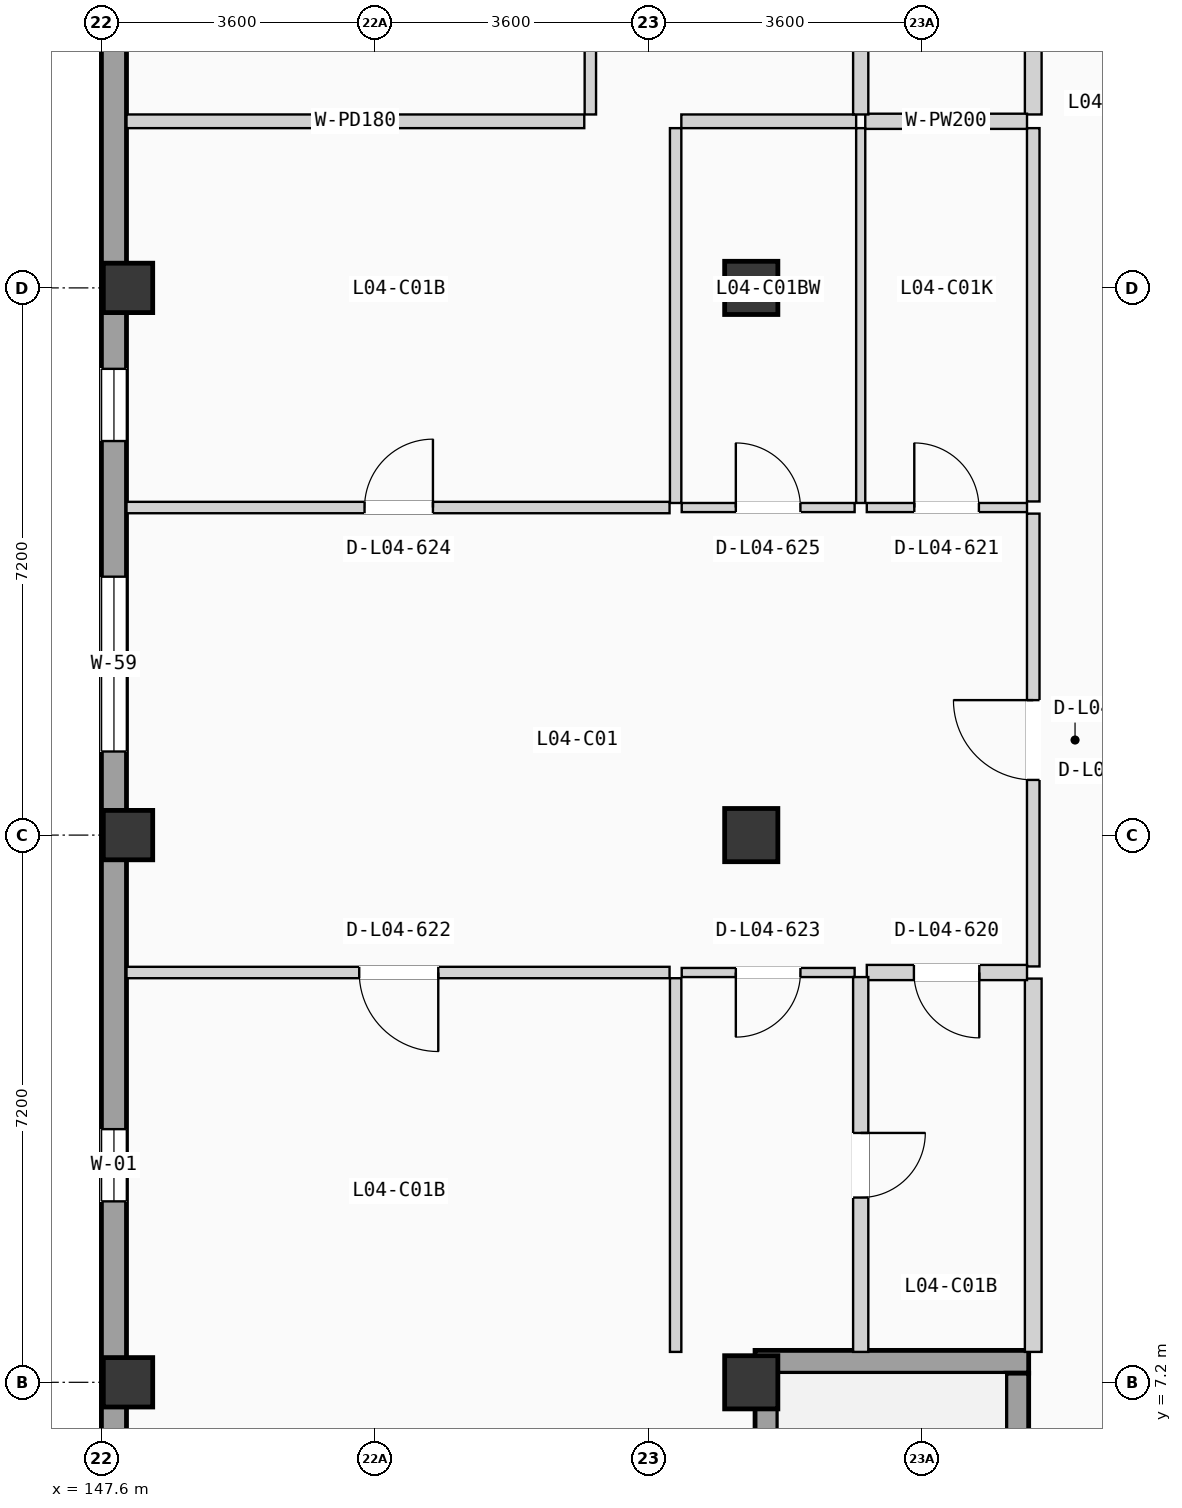
"""IFC4 building model, lengths in metres.
Left out: names, types, materials, properties, quantities, classifications, styles, units other than length and angle.
Written with IfcOpenShell. Run it as: python <this file> out.ifc"""

import sys

from ifc_helpers import new_model, si_unit, direction, frame, frame_2d, origin, origin_2d, place, context, subcontext, project, spatial, rectangle, extrude, element, fill, save


model = new_model("IFC4")
c1 = context("Model", 3, precision=1e-05, world=origin(), true_north=direction((0.0, 1.0)))
c2 = subcontext(c1, "Body", "Model", "MODEL_VIEW")
j1 = project(units=[si_unit("LENGTHUNIT", "METRE"), si_unit("PLANEANGLEUNIT", "RADIAN")], contexts=[c1])
p1 = place(None, origin())
s1 = spatial("IfcSite", under=j1, at=p1, CompositionType="ELEMENT")
p2 = place(p1, origin())
s2 = spatial("IfcBuilding", under=s1, at=p2, CompositionType="ELEMENT")
p3 = place(p2, frame((0.0, 0.0, 15.225)))
s3 = spatial("IfcBuildingStorey", under=s2, at=p3, CompositionType="ELEMENT", Elevation=15.225)
for number, where, z_axis, x_axis in (
    (1, (147.95, 7.2, 0.0), (0.0, 0.0, 1.0), (1.0, 0.0, 0.0)),
    (2, (147.95, 14.4, 0.0), (0.0, 0.0, 1.0), (1.0, 0.0, 0.0)),
    (3, (147.95, 21.6, 0.0), (0.0, 0.0, 1.0), (1.0, 0.0, 0.0)),
):
    element("IfcColumn", number, at=place(p3, frame(where, z_axis=z_axis, x_axis=x_axis)), inside=s3, PredefinedType="COLUMN", context=c2, shape_type="SweptSolid", body=[
        extrude(rectangle(XDim=0.65, YDim=0.65, at=origin_2d()), origin(), (0.0, 0.0, 1.0), 3.15),
    ])
for number, where, z_axis, x_axis in (
    (4, (156.15, 7.2, 0.0), (0.0, 0.0, 1.0), (1.0, 0.0, 0.0)),
    (5, (156.15, 14.4, 0.0), (0.0, 0.0, 1.0), (1.0, 0.0, 0.0)),
    (6, (156.15, 21.6, 0.0), (0.0, 0.0, 1.0), (1.0, 0.0, 0.0)),
):
    element("IfcColumn", number, at=place(p3, frame(where, z_axis=z_axis, x_axis=x_axis)), inside=s3, PredefinedType="COLUMN", context=c2, shape_type="SweptSolid", body=[
        extrude(rectangle(XDim=0.7, YDim=0.7, at=origin_2d()), origin(), (0.0, 0.0, 1.0), 3.15),
    ])
p4 = place(p3, frame((147.765, 0.33, 0.0), z_axis=(0.0, 0.0, 1.0), x_axis=(0.0, 1.0, 0.0)))
e7 = element("IfcWall", 7, at=p4, inside=s3, PredefinedType="SOLIDWALL", context=c2, shape_type="SweptSolid", body=[
    extrude(rectangle(XDim=49.74, YDim=0.33, at=frame_2d((24.87, 0.0))), origin(), (0.0, 0.0, 1.0), 2.89),
])
p5 = place(p4, frame((15.17, 0.0, 0.555)))
e8 = element("IfcOpeningElement", 8, at=p5, cuts=e7, PredefinedType="OPENING", context=c2, shape_type="SweptSolid", body=[
    extrude(rectangle(XDim=2.3, YDim=1.65, at=frame_2d((1.15, 0.825))), frame((0.0, 0.175, 0.0), z_axis=(0.0, -1.0, 0.0), x_axis=(1.0, 0.0, 0.0)), (0.0, 0.0, 1.0), 0.35),
])
p6 = place(p4, frame((9.251, 0.0, 0.85)))
e9 = element("IfcOpeningElement", 9, at=p6, cuts=e7, PredefinedType="OPENING", context=c2, shape_type="SweptSolid", body=[
    extrude(rectangle(XDim=0.95, YDim=1.2, at=frame_2d((0.475, 0.6))), frame((0.0, 0.175, 0.0), z_axis=(0.0, -1.0, 0.0), x_axis=(1.0, 0.0, 0.0)), (0.0, 0.0, 1.0), 0.35),
])
p7 = place(p4, frame((19.255, 0.0, 0.9)))
e10 = element("IfcOpeningElement", 10, at=p7, cuts=e7, PredefinedType="OPENING", context=c2, shape_type="SweptSolid", body=[
    extrude(rectangle(XDim=0.95, YDim=1.2, at=frame_2d((0.475, 0.6))), frame((0.0, 0.175, 0.0), z_axis=(0.0, -1.0, 0.0), x_axis=(1.0, 0.0, 0.0)), (0.0, 0.0, 1.0), 0.35),
])
p8 = place(p4, frame((31.616, 0.0, 0.855)))
e11 = element("IfcOpeningElement", 11, at=p8, cuts=e7, PredefinedType="OPENING", context=c2, shape_type="SweptSolid", body=[
    extrude(rectangle(XDim=0.95, YDim=1.35, at=frame_2d((0.475, 0.675))), frame((0.0, 0.175, 0.0), z_axis=(0.0, -1.0, 0.0), x_axis=(1.0, 0.0, 0.0)), (0.0, 0.0, 1.0), 0.35),
])
p9 = place(p4, frame((25.401, 0.0, 0.705)))
e12 = element("IfcOpeningElement", 12, at=p9, cuts=e7, PredefinedType="OPENING", context=c2, shape_type="SweptSolid", body=[
    extrude(rectangle(XDim=0.95, YDim=1.5, at=frame_2d((0.475, 0.75))), frame((0.0, 0.175, 0.0), z_axis=(0.0, -1.0, 0.0), x_axis=(1.0, 0.0, 0.0)), (0.0, 0.0, 1.0), 0.35),
])
p10 = place(p4, frame((38.73, 0.0, 0.555)))
e13 = element("IfcOpeningElement", 13, at=p10, cuts=e7, PredefinedType="OPENING", context=c2, shape_type="SweptSolid", body=[
    extrude(rectangle(XDim=0.95, YDim=1.65, at=frame_2d((0.475, 0.825))), frame((0.0, 0.175, 0.0), z_axis=(0.0, -1.0, 0.0), x_axis=(1.0, 0.0, 0.0)), (0.0, 0.0, 1.0), 0.35),
])
p11 = place(p3, frame((156.2, 7.47, 0.0), z_axis=(0.0, 0.0, 1.0), x_axis=(1.0, 0.0, 0.0)))
e14 = element("IfcWall", 14, at=p11, inside=s3, PredefinedType="SHEAR", context=c2, shape_type="SweptSolid", body=[
    extrude(rectangle(XDim=3.6, YDim=0.3, at=frame_2d((1.8, 0.0))), origin(), (0.0, 0.0, 1.0), 2.89),
])
p12 = place(p3, frame((156.35, 0.32, 0.0), z_axis=(0.0, 0.0, 1.0), x_axis=(0.0, 1.0, 0.0)))
e15 = element("IfcWall", 15, at=p12, inside=s3, PredefinedType="SHEAR", context=c2, shape_type="SweptSolid", body=[
    extrude(rectangle(XDim=7.0, YDim=0.3, at=frame_2d((3.5, 0.0))), origin(), (0.0, 0.0, 1.0), 2.89),
])
p13 = place(p3, frame((159.65, 0.32, 0.0), z_axis=(0.0, 0.0, 1.0), x_axis=(0.0, 1.0, 0.0)))
e16 = element("IfcWall", 16, at=p13, inside=s3, PredefinedType="SHEAR", context=c2, shape_type="SweptSolid", body=[
    extrude(rectangle(XDim=7.0, YDim=0.3, at=frame_2d((3.5, 0.0))), origin(), (0.0, 0.0, 1.0), 2.89),
])
p14 = place(p13, frame((0.225, 0.0, 0.0)))
e17 = element("IfcOpeningElement", 17, at=p14, cuts=e16, PredefinedType="OPENING", context=c2, shape_type="SweptSolid", body=[
    extrude(rectangle(XDim=1.15, YDim=2.12, at=frame_2d((0.575, 1.06))), frame((0.0, 0.16, 0.0), z_axis=(0.0, -1.0, 0.0), x_axis=(1.0, 0.0, 0.0)), (0.0, 0.0, 1.0), 0.32),
])
p15 = place(p3, frame((159.86, 12.672, 0.0), z_axis=(0.0, 0.0, 1.0), x_axis=(0.0, 1.0, 0.0)))
e18 = element("IfcWall", 18, at=p15, inside=s3, PredefinedType="PARTITIONING", context=c2, shape_type="SweptSolid", body=[
    extrude(rectangle(XDim=5.958, YDim=0.165, at=frame_2d((2.979, 0.0))), origin(), (0.0, 0.0, 1.0), 2.87),
])
p16 = place(p15, frame((2.454, 0.0, 0.0)))
e19 = element("IfcOpeningElement", 19, at=p16, cuts=e18, PredefinedType="OPENING", context=c2, shape_type="SweptSolid", body=[
    extrude(rectangle(XDim=1.05, YDim=2.13, at=frame_2d((0.525, 1.065))), frame((0.0, 0.093, 0.0), z_axis=(0.0, -1.0, 0.0), x_axis=(1.0, 0.0, 0.0)), (0.0, 0.0, 1.0), 0.185),
])
p17 = place(p3, frame((159.86, 7.6, 0.0), z_axis=(0.0, 0.0, 1.0), x_axis=(0.0, 1.0, 0.0)))
e20 = element("IfcWall", 20, at=p17, inside=s3, PredefinedType="PLUMBINGWALL", context=c2, shape_type="SweptSolid", body=[
    extrude(rectangle(XDim=4.912, YDim=0.22, at=frame_2d((2.456, 0.0))), origin(), (0.0, 0.0, 1.0), 2.87),
])
p18 = place(p3, frame((159.86, 18.79, 0.0), z_axis=(0.0, 0.0, 1.0), x_axis=(0.0, 1.0, 0.0)))
e21 = element("IfcWall", 21, at=p18, inside=s3, PredefinedType="PARTITIONING", context=c2, shape_type="SweptSolid", body=[
    extrude(rectangle(XDim=4.912, YDim=0.165, at=frame_2d((2.456, 0.0))), origin(), (0.0, 0.0, 1.0), 2.87),
])
p19 = place(p3, frame((159.86, 23.882, 0.0), z_axis=(0.0, 0.0, 1.0), x_axis=(0.0, 1.0, 0.0)))
e22 = element("IfcWall", 22, at=p19, inside=s3, PredefinedType="PLUMBINGWALL", context=c2, shape_type="SweptSolid", body=[
    extrude(rectangle(XDim=5.83, YDim=0.22, at=frame_2d((2.915, 0.0))), origin(), (0.0, 0.0, 1.0), 2.87),
])
p20 = place(p3, frame((157.67, 12.592, 0.0), z_axis=(0.0, 0.0, 1.0), x_axis=(1.0, 0.0, 0.0)))
e23 = element("IfcWall", 23, at=p20, inside=s3, PredefinedType="PLUMBINGWALL", context=c2, shape_type="SweptSolid", body=[
    extrude(rectangle(XDim=2.108, YDim=0.2, at=frame_2d((1.054, 0.0))), origin(), (0.0, 0.0, 1.0), 2.87),
])
p21 = place(p20, frame((0.62, 0.0, 0.0)))
e24 = element("IfcOpeningElement", 24, at=p21, cuts=e23, PredefinedType="OPENING", context=c2, shape_type="SweptSolid", body=[
    extrude(rectangle(XDim=0.86, YDim=2.0, at=frame_2d((0.43, 1.0))), frame((0.0, 0.11, 0.0), z_axis=(0.0, -1.0, 0.0), x_axis=(1.0, 0.0, 0.0)), (0.0, 0.0, 1.0), 0.22),
])
p22 = place(p3, frame((157.67, 18.71, 0.0), z_axis=(0.0, 0.0, 1.0), x_axis=(1.0, 0.0, 0.0)))
e25 = element("IfcWall", 25, at=p22, inside=s3, PredefinedType="PARTITIONING", context=c2, shape_type="SweptSolid", body=[
    extrude(rectangle(XDim=2.108, YDim=0.12, at=frame_2d((1.054, 0.0))), origin(), (0.0, 0.0, 1.0), 2.87),
])
p23 = place(p22, frame((0.625, 0.0, 0.0)))
e26 = element("IfcOpeningElement", 26, at=p23, cuts=e25, PredefinedType="OPENING", context=c2, shape_type="SweptSolid", body=[
    extrude(rectangle(XDim=0.85, YDim=2.01, at=frame_2d((0.425, 1.005))), frame((0.0, 0.07, 0.0), z_axis=(0.0, -1.0, 0.0), x_axis=(1.0, 0.0, 0.0)), (0.0, 0.0, 1.0), 0.14),
])
p24 = place(p3, frame((147.93, 12.592, 0.0), z_axis=(0.0, 0.0, 1.0), x_axis=(1.0, 0.0, 0.0)))
e27 = element("IfcWall", 27, at=p24, inside=s3, PredefinedType="PARTITIONING", context=c2, shape_type="SweptSolid", body=[
    extrude(rectangle(XDim=7.145, YDim=0.15, at=frame_2d((3.573, 0.0))), origin(), (0.0, 0.0, 1.0), 2.87),
])
p25 = place(p24, frame((3.062, 0.0, 0.0)))
e28 = element("IfcOpeningElement", 28, at=p25, cuts=e27, PredefinedType="OPENING", context=c2, shape_type="SweptSolid", body=[
    extrude(rectangle(XDim=1.04, YDim=2.08, at=frame_2d((0.52, 1.04))), frame((0.0, 0.085, 0.0), z_axis=(0.0, -1.0, 0.0), x_axis=(1.0, 0.0, 0.0)), (0.0, 0.0, 1.0), 0.17),
])
p26 = place(p3, frame((155.235, 12.592, 0.0), z_axis=(0.0, 0.0, 1.0), x_axis=(1.0, 0.0, 0.0)))
e29 = element("IfcWall", 29, at=p26, inside=s3, PredefinedType="PARTITIONING", context=c2, shape_type="SweptSolid", body=[
    extrude(rectangle(XDim=2.275, YDim=0.12, at=frame_2d((1.137, 0.0))), origin(), (0.0, 0.0, 1.0), 2.87),
])
p27 = place(p26, frame((0.712, 0.0, 0.0)))
e30 = element("IfcOpeningElement", 30, at=p27, cuts=e29, PredefinedType="OPENING", context=c2, shape_type="SweptSolid", body=[
    extrude(rectangle(XDim=0.85, YDim=2.01, at=frame_2d((0.425, 1.005))), frame((0.0, 0.07, 0.0), z_axis=(0.0, -1.0, 0.0), x_axis=(1.0, 0.0, 0.0)), (0.0, 0.0, 1.0), 0.14),
])
p28 = place(p3, frame((147.93, 18.71, 0.0), z_axis=(0.0, 0.0, 1.0), x_axis=(1.0, 0.0, 0.0)))
e31 = element("IfcWall", 31, at=p28, inside=s3, PredefinedType="PARTITIONING", context=c2, shape_type="SweptSolid", body=[
    extrude(rectangle(XDim=7.145, YDim=0.15, at=frame_2d((3.573, 0.0))), origin(), (0.0, 0.0, 1.0), 2.87),
])
p29 = place(p28, frame((3.132, 0.0, 0.0)))
e32 = element("IfcOpeningElement", 32, at=p29, cuts=e31, PredefinedType="OPENING", context=c2, shape_type="SweptSolid", body=[
    extrude(rectangle(XDim=0.9, YDim=2.04, at=frame_2d((0.45, 1.02))), frame((0.0, 0.085, 0.0), z_axis=(0.0, -1.0, 0.0), x_axis=(1.0, 0.0, 0.0)), (0.0, 0.0, 1.0), 0.17),
])
p30 = place(p3, frame((155.235, 18.71, 0.0), z_axis=(0.0, 0.0, 1.0), x_axis=(1.0, 0.0, 0.0)))
e33 = element("IfcWall", 33, at=p30, inside=s3, PredefinedType="PARTITIONING", context=c2, shape_type="SweptSolid", body=[
    extrude(rectangle(XDim=2.275, YDim=0.12, at=frame_2d((1.137, 0.0))), origin(), (0.0, 0.0, 1.0), 2.87),
])
p31 = place(p30, frame((0.712, 0.0, 0.0)))
e34 = element("IfcOpeningElement", 34, at=p31, cuts=e33, PredefinedType="OPENING", context=c2, shape_type="SweptSolid", body=[
    extrude(rectangle(XDim=0.85, YDim=2.01, at=frame_2d((0.425, 1.005))), frame((0.0, 0.07, 0.0), z_axis=(0.0, -1.0, 0.0), x_axis=(1.0, 0.0, 0.0)), (0.0, 0.0, 1.0), 0.14),
])
p32 = place(p3, frame((157.59, 7.6, 0.0), z_axis=(0.0, 0.0, 1.0), x_axis=(0.0, 1.0, 0.0)))
e35 = element("IfcWall", 35, at=p32, inside=s3, PredefinedType="PLUMBINGWALL", context=c2, shape_type="SweptSolid", body=[
    extrude(rectangle(XDim=4.932, YDim=0.2, at=frame_2d((2.466, 0.0))), origin(), (0.0, 0.0, 1.0), 2.87),
])
p33 = place(p32, frame((2.031, 0.0, 0.0)))
e36 = element("IfcOpeningElement", 36, at=p33, cuts=e35, PredefinedType="OPENING", context=c2, shape_type="SweptSolid", body=[
    extrude(rectangle(XDim=0.85, YDim=2.01, at=frame_2d((0.425, 1.005))), frame((0.0, 0.11, 0.0), z_axis=(0.0, -1.0, 0.0), x_axis=(1.0, 0.0, 0.0)), (0.0, 0.0, 1.0), 0.22),
])
p34 = place(p3, frame((157.59, 18.77, 0.0), z_axis=(0.0, 0.0, 1.0), x_axis=(0.0, 1.0, 0.0)))
e37 = element("IfcWall", 37, at=p34, inside=s3, PredefinedType="PARTITIONING", context=c2, shape_type="SweptSolid", body=[
    extrude(rectangle(XDim=4.932, YDim=0.12, at=frame_2d((2.466, 0.0))), origin(), (0.0, 0.0, 1.0), 2.87),
])
p35 = place(p3, frame((157.65, 23.792, 0.0), z_axis=(0.0, 0.0, 1.0), x_axis=(1.0, 0.0, 0.0)))
e38 = element("IfcWall", 38, at=p35, inside=s3, PredefinedType="PLUMBINGWALL", context=c2, shape_type="SweptSolid", body=[
    extrude(rectangle(XDim=2.128, YDim=0.2, at=frame_2d((1.064, 0.0))), origin(), (0.0, 0.0, 1.0), 2.87),
])
p36 = place(p3, frame((155.155, 7.6, 0.0), z_axis=(0.0, 0.0, 1.0), x_axis=(0.0, 1.0, 0.0)))
e39 = element("IfcWall", 39, at=p36, inside=s3, PredefinedType="PARTITIONING", context=c2, shape_type="SweptSolid", body=[
    extrude(rectangle(XDim=4.917, YDim=0.15, at=frame_2d((2.458, 0.0))), origin(), (0.0, 0.0, 1.0), 2.87),
])
p37 = place(p3, frame((155.155, 18.77, 0.0), z_axis=(0.0, 0.0, 1.0), x_axis=(0.0, 1.0, 0.0)))
e40 = element("IfcWall", 40, at=p37, inside=s3, PredefinedType="PARTITIONING", context=c2, shape_type="SweptSolid", body=[
    extrude(rectangle(XDim=4.932, YDim=0.15, at=frame_2d((2.466, 0.0))), origin(), (0.0, 0.0, 1.0), 2.87),
])
p38 = place(p3, frame((147.93, 23.792, 0.0), z_axis=(0.0, 0.0, 1.0), x_axis=(1.0, 0.0, 0.0)))
e41 = element("IfcWall", 41, at=p38, inside=s3, PredefinedType="PARTITIONING", context=c2, shape_type="SweptSolid", body=[
    extrude(rectangle(XDim=6.023, YDim=0.18, at=frame_2d((3.011, 0.0))), origin(), (0.0, 0.0, 1.0), 2.87),
])
p39 = place(p3, frame((155.23, 23.792, 0.0), z_axis=(0.0, 0.0, 1.0), x_axis=(1.0, 0.0, 0.0)))
e42 = element("IfcWall", 42, at=p39, inside=s3, PredefinedType="PARTITIONING", context=c2, shape_type="SweptSolid", body=[
    extrude(rectangle(XDim=2.3, YDim=0.18, at=frame_2d((1.15, 0.0))), origin(), (0.0, 0.0, 1.0), 2.87),
])
p40 = place(p3, frame((157.59, 23.882, 0.0), z_axis=(0.0, 0.0, 1.0), x_axis=(0.0, 1.0, 0.0)))
e43 = element("IfcWall", 43, at=p40, inside=s3, PredefinedType="PLUMBINGWALL", context=c2, shape_type="SweptSolid", body=[
    extrude(rectangle(XDim=5.85, YDim=0.2, at=frame_2d((2.925, 0.0))), origin(), (0.0, 0.0, 1.0), 2.87),
])
p41 = place(p40, frame((2.49, 0.0, 0.0)))
e44 = element("IfcOpeningElement", 44, at=p41, cuts=e43, PredefinedType="OPENING", context=c2, shape_type="SweptSolid", body=[
    extrude(rectangle(XDim=0.85, YDim=2.01, at=frame_2d((0.425, 1.005))), frame((0.0, 0.11, 0.0), z_axis=(0.0, -1.0, 0.0), x_axis=(1.0, 0.0, 0.0)), (0.0, 0.0, 1.0), 0.22),
])
p42 = place(p3, frame((154.033, 23.882, 0.0), z_axis=(0.0, 0.0, 1.0), x_axis=(0.0, 1.0, 0.0)))
e45 = element("IfcWall", 45, at=p42, inside=s3, PredefinedType="PARTITIONING", context=c2, shape_type="SweptSolid", body=[
    extrude(rectangle(XDim=5.835, YDim=0.15, at=frame_2d((2.917, 0.0))), origin(), (0.0, 0.0, 1.0), 2.87),
])
p43 = place(p5, origin())
e46 = element("IfcWindow", 46, at=p43, inside=s3, PartitioningType="DOUBLE_PANEL_VERTICAL", PredefinedType="WINDOW", context=c2, shape_type="SweptSolid", body=[
    extrude(rectangle(XDim=2.3, YDim=1.65, at=frame_2d((1.15, 0.825))), frame((0.0, 0.03, 0.0), z_axis=(0.0, -1.0, 0.0), x_axis=(1.0, 0.0, 0.0)), (0.0, 0.0, 1.0), 0.06),
])
fill(e8, e46)
p44 = place(p6, origin())
e47 = element("IfcWindow", 47, at=p44, inside=s3, PartitioningType="SINGLE_PANEL", PredefinedType="WINDOW", context=c2, shape_type="SweptSolid", body=[
    extrude(rectangle(XDim=0.95, YDim=1.2, at=frame_2d((0.475, 0.6))), frame((0.0, 0.03, 0.0), z_axis=(0.0, -1.0, 0.0), x_axis=(1.0, 0.0, 0.0)), (0.0, 0.0, 1.0), 0.06),
])
fill(e9, e47)
p45 = place(p7, origin())
e48 = element("IfcWindow", 48, at=p45, inside=s3, PartitioningType="SINGLE_PANEL", PredefinedType="WINDOW", context=c2, shape_type="SweptSolid", body=[
    extrude(rectangle(XDim=0.95, YDim=1.2, at=frame_2d((0.475, 0.6))), frame((0.0, 0.03, 0.0), z_axis=(0.0, -1.0, 0.0), x_axis=(1.0, 0.0, 0.0)), (0.0, 0.0, 1.0), 0.06),
])
fill(e10, e48)
p46 = place(p16, origin())
e49 = element("IfcDoor", 49, at=p46, inside=s3, OperationType="SINGLE_SWING_RIGHT", PredefinedType="DOOR", context=c2, shape_type="SweptSolid", body=[
    extrude(rectangle(XDim=1.05, YDim=2.13, at=frame_2d((0.525, 1.065))), frame((0.0, 0.025, 0.0), z_axis=(0.0, -1.0, 0.0), x_axis=(1.0, 0.0, 0.0)), (0.0, 0.0, 1.0), 0.05),
])
fill(e19, e49)
p47 = place(p21, frame((0.86, 0.0, 0.0), z_axis=(0.0, 0.0, 1.0), x_axis=(-1.0, 0.0, 0.0)))
e50 = element("IfcDoor", 50, at=p47, inside=s3, OperationType="SINGLE_SWING_RIGHT", PredefinedType="DOOR", context=c2, shape_type="SweptSolid", body=[
    extrude(rectangle(XDim=0.86, YDim=2.0, at=frame_2d((0.43, 1.0))), frame((0.0, 0.025, 0.0), z_axis=(0.0, -1.0, 0.0), x_axis=(1.0, 0.0, 0.0)), (0.0, 0.0, 1.0), 0.05),
])
fill(e24, e50)
p48 = place(p23, origin())
e51 = element("IfcDoor", 51, at=p48, inside=s3, OperationType="SINGLE_SWING_LEFT", PredefinedType="DOOR", context=c2, shape_type="SweptSolid", body=[
    extrude(rectangle(XDim=0.85, YDim=2.01, at=frame_2d((0.425, 1.005))), frame((0.0, 0.025, 0.0), z_axis=(0.0, -1.0, 0.0), x_axis=(1.0, 0.0, 0.0)), (0.0, 0.0, 1.0), 0.05),
])
fill(e26, e51)
p49 = place(p25, frame((1.04, 0.0, 0.0), z_axis=(0.0, 0.0, 1.0), x_axis=(-1.0, 0.0, 0.0)))
e52 = element("IfcDoor", 52, at=p49, inside=s3, OperationType="SINGLE_SWING_RIGHT", PredefinedType="DOOR", context=c2, shape_type="SweptSolid", body=[
    extrude(rectangle(XDim=1.04, YDim=2.08, at=frame_2d((0.52, 1.04))), frame((0.0, 0.025, 0.0), z_axis=(0.0, -1.0, 0.0), x_axis=(1.0, 0.0, 0.0)), (0.0, 0.0, 1.0), 0.05),
])
fill(e28, e52)
p50 = place(p27, frame((0.85, 0.0, 0.0), z_axis=(0.0, 0.0, 1.0), x_axis=(-1.0, 0.0, 0.0)))
e53 = element("IfcDoor", 53, at=p50, inside=s3, OperationType="SINGLE_SWING_LEFT", PredefinedType="DOOR", context=c2, shape_type="SweptSolid", body=[
    extrude(rectangle(XDim=0.85, YDim=2.01, at=frame_2d((0.425, 1.005))), frame((0.0, 0.025, 0.0), z_axis=(0.0, -1.0, 0.0), x_axis=(1.0, 0.0, 0.0)), (0.0, 0.0, 1.0), 0.05),
])
fill(e30, e53)
p51 = place(p29, origin())
e54 = element("IfcDoor", 54, at=p51, inside=s3, OperationType="SINGLE_SWING_RIGHT", PredefinedType="DOOR", context=c2, shape_type="SweptSolid", body=[
    extrude(rectangle(XDim=0.9, YDim=2.04, at=frame_2d((0.45, 1.02))), frame((0.0, 0.025, 0.0), z_axis=(0.0, -1.0, 0.0), x_axis=(1.0, 0.0, 0.0)), (0.0, 0.0, 1.0), 0.05),
])
fill(e32, e54)
p52 = place(p31, origin())
e55 = element("IfcDoor", 55, at=p52, inside=s3, OperationType="SINGLE_SWING_LEFT", PredefinedType="DOOR", context=c2, shape_type="SweptSolid", body=[
    extrude(rectangle(XDim=0.85, YDim=2.01, at=frame_2d((0.425, 1.005))), frame((0.0, 0.025, 0.0), z_axis=(0.0, -1.0, 0.0), x_axis=(1.0, 0.0, 0.0)), (0.0, 0.0, 1.0), 0.05),
])
fill(e34, e55)
p53 = place(p33, frame((0.85, 0.0, 0.0), z_axis=(0.0, 0.0, 1.0), x_axis=(-1.0, 0.0, 0.0)))
e56 = element("IfcDoor", 56, at=p53, inside=s3, OperationType="SINGLE_SWING_RIGHT", PredefinedType="DOOR", context=c2, shape_type="SweptSolid", body=[
    extrude(rectangle(XDim=0.85, YDim=2.01, at=frame_2d((0.425, 1.005))), frame((0.0, 0.025, 0.0), z_axis=(0.0, -1.0, 0.0), x_axis=(1.0, 0.0, 0.0)), (0.0, 0.0, 1.0), 0.05),
])
fill(e36, e56)
save(model, sys.argv[1])
